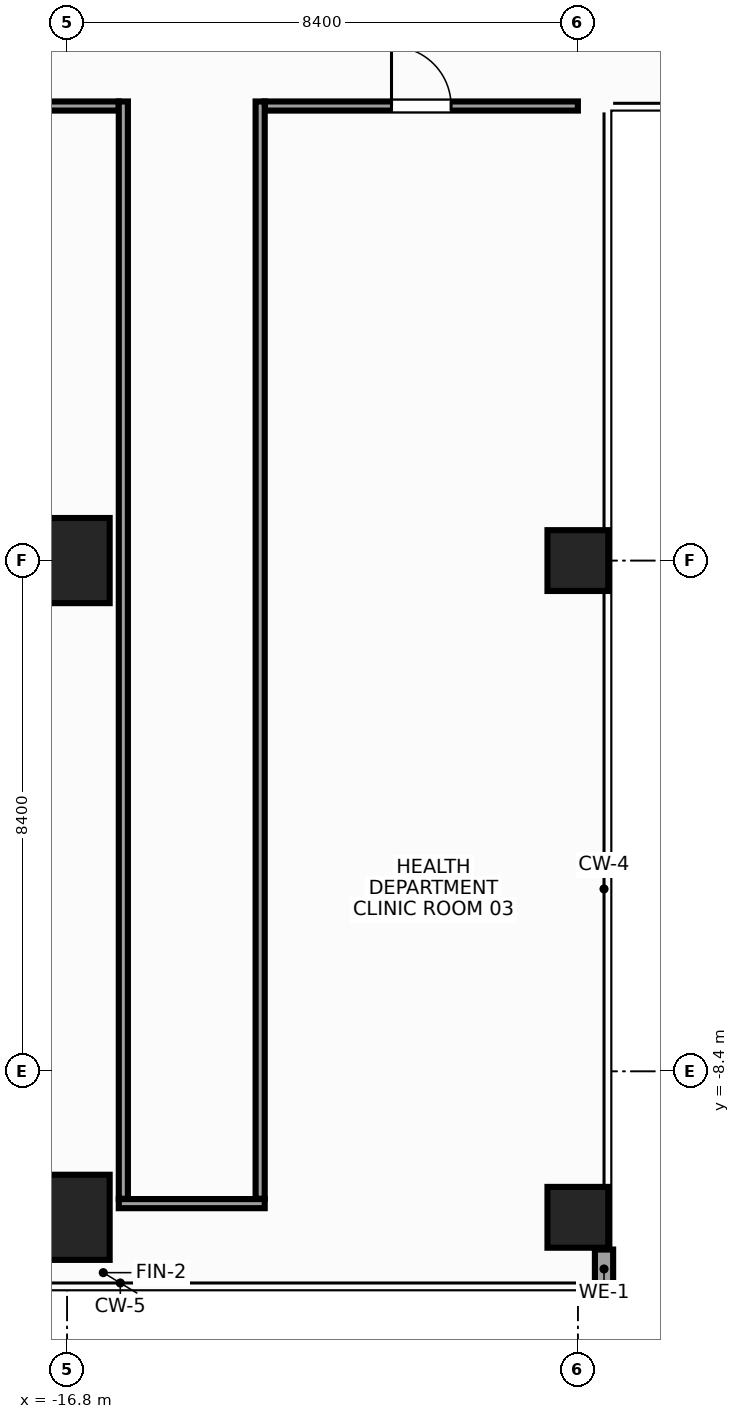
"""IFC4 building model, lengths in metres.
Left out: names, types, materials, properties, quantities, classifications, styles, units other than length and angle.
Written with IfcOpenShell. Run it as: python <this file> out.ifc"""

import sys

from ifc_helpers import new_model, si_unit, direction, frame, frame_2d, origin, origin_2d, place, context, subcontext, project, spatial, rectangle, hollow_rectangle, extrude, source, transform, mapped, element, fill, save


model = new_model("IFC4")
c1 = context("Model", 3, precision=1e-05, world=origin(), true_north=direction((0.0, 1.0)))
c2 = subcontext(c1, "Body", "Model", "MODEL_VIEW")
j1 = project(units=[si_unit("LENGTHUNIT", "METRE"), si_unit("PLANEANGLEUNIT", "RADIAN")], contexts=[c1])
p1 = place(None, origin())
s1 = spatial("IfcSite", under=j1, at=p1, CompositionType="ELEMENT")
p2 = place(p1, origin())
s2 = spatial("IfcBuilding", under=s1, at=p2, CompositionType="ELEMENT")
p3 = place(p2, frame((0.0, 0.0, 207.2)))
s3 = spatial("IfcBuildingStorey", under=s2, at=p3, CompositionType="ELEMENT", Elevation=207.2)
m1 = source(origin(), c2, "Body", "SweptSolid", [
    extrude(rectangle(XDim=1.4, YDim=1.4, at=origin_2d()), origin(), (0.0, 0.0, 1.0), 3.6),
])
for number, where, z_axis, x_axis in (
    (1, (-16.8, -10.8, 0.0), (0.0, 0.0, 1.0), (1.0, 0.0, 0.0)),
    (2, (-16.8, 0.0, 0.0), (0.0, 0.0, 1.0), (1.0, 0.0, 0.0)),
):
    element("IfcColumn", number, at=place(p3, frame(where, z_axis=z_axis, x_axis=x_axis)), inside=s3, PredefinedType="COLUMN", context=c2, shape_type="MappedRepresentation", body=[
        mapped(m1, transform((0.0, 0.0, 0.0), x_axis=(1.0, 0.0, 0.0), y_axis=(0.0, 1.0, 0.0), z_axis=(0.0, 0.0, 1.0), scale=1.0)),
    ])
m2 = source(origin(), c2, "Body", "SweptSolid", [
    extrude(hollow_rectangle(XDim=1.0, YDim=1.0, WallThickness=0.045, at=origin_2d()), origin(), (0.0, 0.0, 1.0), 3.6),
])
for number, where, z_axis, x_axis in (
    (3, (-8.4, 0.0, 0.0), (0.0, 0.0, 1.0), (1.0, 0.0, 0.0)),
    (4, (-8.4, -10.8, 0.0), (0.0, 0.0, 1.0), (1.0, 0.0, 0.0)),
):
    element("IfcColumn", number, at=place(p3, frame(where, z_axis=z_axis, x_axis=x_axis)), inside=s3, PredefinedType="COLUMN", context=c2, shape_type="MappedRepresentation", body=[
        mapped(m2, transform((0.0, 0.0, 0.0), x_axis=(1.0, 0.0, 0.0), y_axis=(0.0, 1.0, 0.0), z_axis=(0.0, 0.0, 1.0), scale=1.0)),
    ])
m3 = source(origin(), c2, "Body", "SweptSolid", [
    extrude(rectangle(XDim=0.64, YDim=0.24, at=frame_2d((0.32, 0.0))), origin(), (0.0, 0.0, 1.0), 2.76),
])
p4 = place(p3, frame((-7.97, -11.97, 0.0), z_axis=(0.0, 0.0, 1.0), x_axis=(0.0, 1.0, 0.0)))
e5 = element("IfcWall", 5, at=p4, inside=s3, PredefinedType="STANDARD", context=c2, shape_type="MappedRepresentation", body=[
    mapped(m3, transform((0.0, 0.0, 0.0), x_axis=(1.0, 0.0, 0.0), y_axis=(0.0, 1.0, 0.0), z_axis=(0.0, 0.0, 1.0), scale=1.0)),
])
m4 = source(origin(), c2, "Body", "SweptSolid", [
    extrude(rectangle(XDim=4.6, YDim=0.15, at=frame_2d((2.3, 0.0))), origin(), (0.0, 0.0, 1.0), 2.765),
])
p5 = place(p3, frame((-20.55, 7.475, 0.0), z_axis=(0.0, 0.0, 1.0), x_axis=(1.0, 0.0, 0.0)))
e6 = element("IfcWall", 6, at=p5, inside=s3, PredefinedType="PARTITIONING", context=c2, shape_type="MappedRepresentation", body=[
    mapped(m4, transform((0.0, 0.0, 0.0), x_axis=(1.0, 0.0, 0.0), y_axis=(0.0, 1.0, 0.0), z_axis=(0.0, 0.0, 1.0), scale=1.0)),
])
p6 = place(p5, frame((1.81, 0.0, 0.0)))
e7 = element("IfcOpeningElement", 7, at=p6, cuts=e6, PredefinedType="OPENING", context=c2, shape_type="SweptSolid", body=[
    extrude(rectangle(XDim=0.98, YDim=2.15, at=frame_2d((0.49, 1.075))), frame((0.0, 0.087, 0.0), z_axis=(0.0, -1.0, 0.0), x_axis=(1.0, 0.0, 0.0)), (0.0, 0.0, 1.0), 0.174),
])
m5 = source(origin(), c2, "Body", "SweptSolid", [
    extrude(rectangle(XDim=5.15, YDim=0.15, at=frame_2d((2.575, 0.0))), origin(), (0.0, 0.0, 1.0), 3.38),
])
p7 = place(p3, frame((-13.55, 7.475, 0.0), z_axis=(0.0, 0.0, 1.0), x_axis=(1.0, 0.0, 0.0)))
e8 = element("IfcWall", 8, at=p7, inside=s3, PredefinedType="PARTITIONING", context=c2, shape_type="MappedRepresentation", body=[
    mapped(m5, transform((0.0, 0.0, 0.0), x_axis=(1.0, 0.0, 0.0), y_axis=(0.0, 1.0, 0.0), z_axis=(0.0, 0.0, 1.0), scale=1.0)),
])
p8 = place(p7, frame((2.085, 0.0, 0.0)))
e9 = element("IfcOpeningElement", 9, at=p8, cuts=e8, PredefinedType="OPENING", context=c2, shape_type="SweptSolid", body=[
    extrude(rectangle(XDim=0.98, YDim=2.15, at=frame_2d((0.49, 1.075))), frame((0.0, 0.087, 0.0), z_axis=(0.0, -1.0, 0.0), x_axis=(1.0, 0.0, 0.0)), (0.0, 0.0, 1.0), 0.174),
])
m6 = source(origin(), c2, "Body", "SweptSolid", [
    extrude(rectangle(XDim=2.4, YDim=0.15, at=frame_2d((1.2, 0.0))), origin(), (0.0, 0.0, 1.0), 2.915),
])
p9 = place(p3, frame((-15.95, -10.575, 0.0), z_axis=(0.0, 0.0, 1.0), x_axis=(1.0, 0.0, 0.0)))
e10 = element("IfcWall", 10, at=p9, inside=s3, PredefinedType="PARTITIONING", context=c2, shape_type="MappedRepresentation", body=[
    mapped(m6, transform((0.0, 0.0, 0.0), x_axis=(1.0, 0.0, 0.0), y_axis=(0.0, 1.0, 0.0), z_axis=(0.0, 0.0, 1.0), scale=1.0)),
])
m7 = source(origin(), c2, "Body", "SweptSolid", [
    extrude(rectangle(XDim=18.045, YDim=0.15, at=frame_2d((9.022, 0.0))), origin(), (0.0, 0.0, 1.0), 2.915),
])
for number, where, z_axis, x_axis in (
    (11, (-15.875, -10.495, 0.0), (0.0, 0.0, 1.0), (0.0, 1.0, 0.0)),
    (12, (-13.625, -10.495, 0.0), (0.0, 0.0, 1.0), (0.0, 1.0, 0.0)),
):
    element("IfcWall", number, at=place(p3, frame(where, z_axis=z_axis, x_axis=x_axis)), inside=s3, PredefinedType="PARTITIONING", context=c2, shape_type="MappedRepresentation", body=[
        mapped(m7, transform((0.0, 0.0, 0.0), x_axis=(1.0, 0.0, 0.0), y_axis=(0.0, 1.0, 0.0), z_axis=(0.0, 0.0, 1.0), scale=1.0)),
    ])
m8 = source(origin(), c2, "Body", "SweptSolid", [
    extrude(rectangle(XDim=0.98, YDim=2.15, at=frame_2d((0.49, 1.075))), frame((0.0, 0.025, 0.0), z_axis=(0.0, -1.0, 0.0), x_axis=(1.0, 0.0, 0.0)), (0.0, 0.0, 1.0), 0.05),
])
p10 = place(p8, origin())
e13 = element("IfcDoor", 13, at=p10, inside=s3, OperationType="SINGLE_SWING_LEFT", PredefinedType="DOOR", context=c2, shape_type="MappedRepresentation", body=[
    mapped(m8, transform((0.0, 0.0, 0.0), x_axis=(1.0, 0.0, 0.0), y_axis=(0.0, 1.0, 0.0), z_axis=(0.0, 0.0, 1.0), scale=1.0)),
])
fill(e9, e13)
save(model, sys.argv[1])
